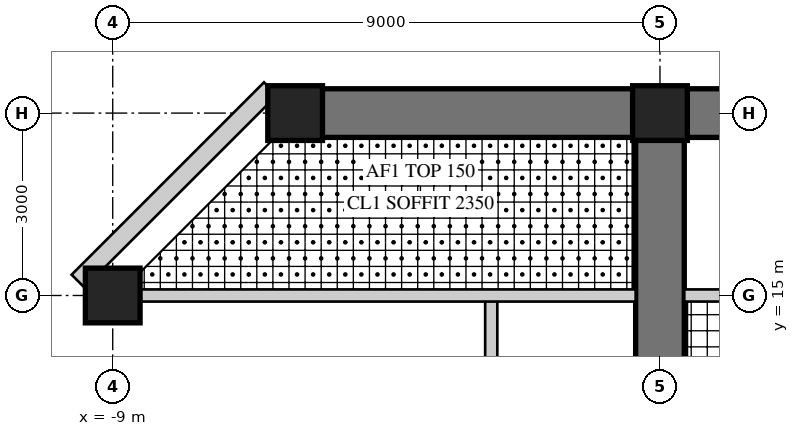
"""IFC4 building model, lengths in metres.
Left out: names, types, materials, properties, quantities, classifications, styles, units other than length and angle.
Written with IfcOpenShell. Run it as: python <this file> out.ifc"""

import sys

from ifc_helpers import new_model, si_unit, direction, frame, frame_2d, origin, origin_2d, place, context, subcontext, project, spatial, rectangle, hollow_rectangle, extrude, element, fill, save


model = new_model("IFC4")
c1 = context("Model", 3, precision=1e-05, world=origin(), true_north=direction((0.0, 1.0)))
c2 = subcontext(c1, "Body", "Model", "MODEL_VIEW")
j1 = project(units=[si_unit("LENGTHUNIT", "METRE"), si_unit("PLANEANGLEUNIT", "RADIAN")], contexts=[c1])
p1 = place(None, origin())
s1 = spatial("IfcSite", under=j1, at=p1, CompositionType="ELEMENT")
p2 = place(p1, origin())
s2 = spatial("IfcBuilding", under=s1, at=p2, CompositionType="ELEMENT")
p3 = place(p2, frame((0.0, 0.0, 189.9)))
s3 = spatial("IfcBuildingStorey", under=s2, at=p3, CompositionType="ELEMENT", Elevation=189.9)
p4 = place(p3, frame((0.0, 9.0, 0.0), z_axis=(0.0, 0.0, 1.0), x_axis=(0.0, 1.0, 0.0)))
e1 = element("IfcWall", 1, at=p4, inside=s3, PredefinedType="SHEAR", context=c2, shape_type="SweptSolid", body=[
    extrude(rectangle(XDim=9.0, YDim=0.8, at=frame_2d((4.5, 0.0))), origin(), (0.0, 0.0, 1.0), 3.4),
])
p5 = place(p4, frame((3.95, 0.0, 0.0)))
e2 = element("IfcOpeningElement", 2, at=p5, cuts=e1, PredefinedType="OPENING", context=c2, shape_type="SweptSolid", body=[
    extrude(rectangle(XDim=1.0, YDim=2.15, at=frame_2d((0.5, 1.075))), frame((0.0, 0.41, 0.0), z_axis=(0.0, -1.0, 0.0), x_axis=(1.0, 0.0, 0.0)), (0.0, 0.0, 1.0), 0.82),
])
p6 = place(p4, frame((7.0, 0.0, 0.0)))
e3 = element("IfcOpeningElement", 3, at=p6, cuts=e1, PredefinedType="OPENING", context=c2, shape_type="SweptSolid", body=[
    extrude(rectangle(XDim=1.0, YDim=2.2, at=frame_2d((0.5, 1.1))), frame((0.0, 0.41, 0.0), z_axis=(0.0, -1.0, 0.0), x_axis=(1.0, 0.0, 0.0)), (0.0, 0.0, 1.0), 0.82),
])
p7 = place(p3, frame((6.0, 18.0, 0.0), z_axis=(0.0, 0.0, 1.0), x_axis=(-1.0, 0.0, 0.0)))
e4 = element("IfcWall", 4, at=p7, inside=s3, PredefinedType="SHEAR", context=c2, shape_type="SweptSolid", body=[
    extrude(rectangle(XDim=12.0, YDim=0.8, at=frame_2d((6.0, 0.0))), origin(), (0.0, 0.0, 1.0), 3.4),
])
p8 = place(p7, frame((1.625, 0.0, 0.6)))
e5 = element("IfcOpeningElement", 5, at=p8, cuts=e4, PredefinedType="OPENING", context=c2, shape_type="SweptSolid", body=[
    extrude(rectangle(XDim=3.0, YDim=2.4, at=frame_2d((1.5, 1.2))), frame((0.0, 0.41, 0.0), z_axis=(0.0, -1.0, 0.0), x_axis=(1.0, 0.0, 0.0)), (0.0, 0.0, 1.0), 0.82),
])
p9 = place(p7, frame((7.375, 0.0, 0.6)))
e6 = element("IfcOpeningElement", 6, at=p9, cuts=e4, PredefinedType="OPENING", context=c2, shape_type="SweptSolid", body=[
    extrude(rectangle(XDim=3.0, YDim=2.4, at=frame_2d((1.5, 1.2))), frame((0.0, 0.41, 0.0), z_axis=(0.0, -1.0, 0.0), x_axis=(1.0, 0.0, 0.0)), (0.0, 0.0, 1.0), 0.82),
])
for number, where, z_axis, x_axis in (
    (7, (-9.0, 15.0, 0.0), (0.0, 0.0, 1.0), (1.0, 0.0, 0.0)),
    (8, (0.0, 18.0, 0.0), (0.0, 0.0, 1.0), (1.0, 0.0, 0.0)),
    (9, (-6.0, 18.0, 0.0), (0.0, 0.0, 1.0), (1.0, 0.0, 0.0)),
):
    element("IfcColumn", number, at=place(p3, frame(where, z_axis=z_axis, x_axis=x_axis)), inside=s3, PredefinedType="COLUMN", context=c2, shape_type="SweptSolid", body=[
        extrude(rectangle(XDim=0.9, YDim=0.9, at=origin_2d()), origin(), (0.0, 0.0, 1.0), 3.4),
    ])
p10 = place(p3, frame((-6.406, 18.4, 0.0), z_axis=(0.0, 0.0, 1.0), x_axis=(-0.707134062067, -0.707079499254, 0.0)))
e10 = element("IfcWall", 10, at=p10, inside=s3, PredefinedType="SOLIDWALL", context=c2, shape_type="SweptSolid", body=[
    extrude(rectangle(XDim=4.475, YDim=0.3, at=frame_2d((2.237, 0.0))), origin(), (0.0, 0.0, 1.0), 3.22),
])
p11 = place(p10, frame((1.787, 0.0, 0.3)))
e11 = element("IfcOpeningElement", 11, at=p11, cuts=e10, PredefinedType="OPENING", context=c2, shape_type="SweptSolid", body=[
    extrude(rectangle(XDim=0.9, YDim=2.4, at=frame_2d((0.45, 1.2))), frame((0.0, 0.16, 0.0), z_axis=(0.0, -1.0, 0.0), x_axis=(1.0, 0.0, 0.0)), (0.0, 0.0, 1.0), 0.32),
])
p12 = place(p3, frame((-2.775, 9.55, 0.0), z_axis=(0.0, 0.0, 1.0), x_axis=(0.0, 1.0, 0.0)))
e12 = element("IfcWall", 12, at=p12, inside=s3, PredefinedType="SOLIDWALL", context=c2, shape_type="SweptSolid", body=[
    extrude(rectangle(XDim=5.45, YDim=0.2, at=frame_2d((2.725, 0.0))), origin(), (0.0, 0.0, 1.0), 3.22),
])
p13 = place(p12, frame((1.2, 0.0, 0.0)))
e13 = element("IfcOpeningElement", 13, at=p13, cuts=e12, PredefinedType="OPENING", context=c2, shape_type="SweptSolid", body=[
    extrude(rectangle(XDim=1.0, YDim=2.2, at=frame_2d((0.5, 1.1))), frame((0.0, 0.11, 0.0), z_axis=(0.0, -1.0, 0.0), x_axis=(1.0, 0.0, 0.0)), (0.0, 0.0, 1.0), 0.22),
])
p14 = place(p3, frame((8.55, 15.0, 0.0), z_axis=(0.0, 0.0, 1.0), x_axis=(-1.0, 0.0, 0.0)))
e14 = element("IfcWall", 14, at=p14, inside=s3, PredefinedType="SOLIDWALL", context=c2, shape_type="SweptSolid", body=[
    extrude(rectangle(XDim=8.15, YDim=0.2, at=frame_2d((4.075, 0.0))), origin(), (0.0, 0.0, 1.0), 2.47),
])
p15 = place(p3, frame((-0.4, 15.0, 0.0), z_axis=(0.0, 0.0, 1.0), x_axis=(-1.0, 0.0, 0.0)))
e15 = element("IfcWall", 15, at=p15, inside=s3, PredefinedType="SOLIDWALL", context=c2, shape_type="SweptSolid", body=[
    extrude(rectangle(XDim=8.15, YDim=0.2, at=frame_2d((4.075, 0.0))), origin(), (0.0, 0.0, 1.0), 2.47),
])
p16 = place(p15, frame((0.4, 0.0, 0.0)))
e16 = element("IfcOpeningElement", 16, at=p16, cuts=e15, PredefinedType="OPENING", context=c2, shape_type="SweptSolid", body=[
    extrude(rectangle(XDim=1.0, YDim=2.2, at=frame_2d((0.5, 1.1))), frame((0.0, 0.11, 0.0), z_axis=(0.0, -1.0, 0.0), x_axis=(1.0, 0.0, 0.0)), (0.0, 0.0, 1.0), 0.22),
])
p17 = place(p9, origin())
e17 = element("IfcWindow", 17, at=p17, inside=s3, PartitioningType="SINGLE_PANEL", PredefinedType="WINDOW", context=c2, shape_type="SweptSolid", body=[
    extrude(hollow_rectangle(XDim=3.0, YDim=2.4, WallThickness=0.06, at=frame_2d((1.5, 1.2))), frame((0.0, 0.03, 0.0), z_axis=(0.0, -1.0, 0.0), x_axis=(1.0, 0.0, 0.0)), (0.0, 0.0, 1.0), 0.06),
    extrude(rectangle(XDim=2.879, YDim=2.279, at=frame_2d((1.5, 1.2))), frame((0.0, 0.03, 0.0), z_axis=(0.0, -1.0, 0.0), x_axis=(1.0, 0.0, 0.0)), (0.0, 0.0, 1.0), 0.06),
])
fill(e6, e17)
p18 = place(p11, origin())
e18 = element("IfcWindow", 18, at=p18, inside=s3, PartitioningType="SINGLE_PANEL", PredefinedType="WINDOW", context=c2, shape_type="SweptSolid", body=[
    extrude(hollow_rectangle(XDim=0.9, YDim=2.4, WallThickness=0.06, at=frame_2d((0.45, 1.2))), frame((0.0, 0.03, 0.0), z_axis=(0.0, -1.0, 0.0), x_axis=(1.0, 0.0, 0.0)), (0.0, 0.0, 1.0), 0.06),
    extrude(rectangle(XDim=0.779, YDim=2.279, at=frame_2d((0.45, 1.2))), frame((0.0, 0.03, 0.0), z_axis=(0.0, -1.0, 0.0), x_axis=(1.0, 0.0, 0.0)), (0.0, 0.0, 1.0), 0.06),
])
fill(e11, e18)
p19 = place(p16, frame((1.0, 0.0, 0.0), z_axis=(0.0, 0.0, 1.0), x_axis=(-1.0, 0.0, 0.0)))
e19 = element("IfcDoor", 19, at=p19, inside=s3, OperationType="SINGLE_SWING_RIGHT", PredefinedType="DOOR", context=c2, shape_type="SweptSolid", body=[
    extrude(rectangle(XDim=1.0, YDim=2.2, at=frame_2d((0.5, 1.1))), frame((0.0, 0.025, 0.0), z_axis=(0.0, -1.0, 0.0), x_axis=(1.0, 0.0, 0.0)), (0.0, 0.0, 1.0), 0.05),
])
fill(e16, e19)
p20 = place(p6, frame((1.0, 0.0, 0.0), z_axis=(0.0, 0.0, 1.0), x_axis=(-1.0, 0.0, 0.0)))
e20 = element("IfcDoor", 20, at=p20, inside=s3, OperationType="SINGLE_SWING_LEFT", PredefinedType="DOOR", context=c2, shape_type="SweptSolid", body=[
    extrude(rectangle(XDim=1.0, YDim=2.2, at=frame_2d((0.5, 1.1))), frame((0.0, 0.025, 0.0), z_axis=(0.0, -1.0, 0.0), x_axis=(1.0, 0.0, 0.0)), (0.0, 0.0, 1.0), 0.05),
])
fill(e3, e20)
save(model, sys.argv[1])
